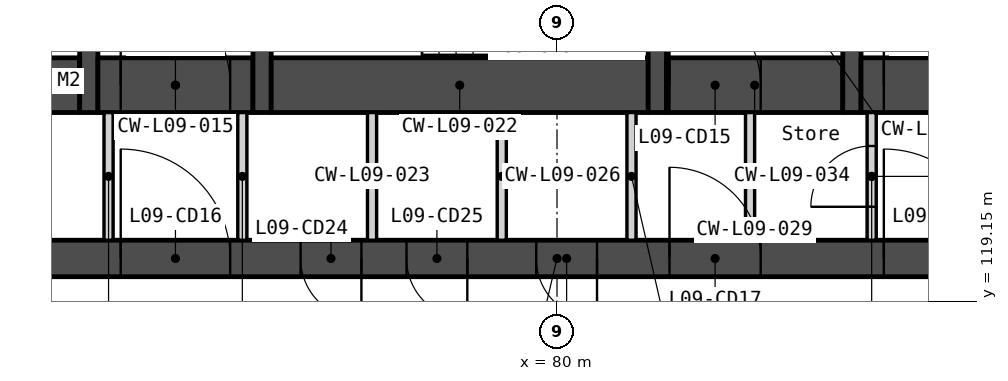
"""IFC4 building model, lengths in metres.
Left out: names, types, materials, properties, quantities, classifications, styles, units other than length and angle.
Written with IfcOpenShell. Run it as: python <this file> out.ifc"""

import sys

from ifc_helpers import new_model, si_unit, direction, frame, frame_2d, origin, place, context, subcontext, project, spatial, polyline, rectangle, outline, extrude, element, fill, save


model = new_model("IFC4")
c1 = context("Model", 3, precision=1e-05, world=origin(), true_north=direction((0.0, 1.0)))
c2 = subcontext(c1, "Body", "Model", "MODEL_VIEW")
j1 = project(units=[si_unit("LENGTHUNIT", "METRE"), si_unit("PLANEANGLEUNIT", "RADIAN")], contexts=[c1])
p1 = place(None, origin())
s1 = spatial("IfcSite", under=j1, at=p1, CompositionType="ELEMENT")
p2 = place(p1, origin())
s2 = spatial("IfcBuilding", under=s1, at=p2, CompositionType="ELEMENT")
p3 = place(p2, frame((0.0, 0.0, 45.5)))
s3 = spatial("IfcBuildingStorey", under=s2, at=p3, CompositionType="ELEMENT", Elevation=45.5)
p4 = place(p3, frame((66.0, 119.85, 0.0), z_axis=(0.0, 0.0, 1.0), x_axis=(1.0, 0.0, 0.0)))
e1 = element("IfcWall", 1, at=p4, inside=s3, PredefinedType="SOLIDWALL", context=c2, shape_type="SweptSolid", body=[
    extrude(rectangle(XDim=28.0, YDim=0.6, at=frame_2d((14.0, 0.0))), origin(), (0.0, 0.0, 1.0), 3.35),
])
p5 = place(p4, frame((6.825, 0.0, 0.0)))
e2 = element("IfcOpeningElement", 2, at=p5, cuts=e1, PredefinedType="OPENING", context=c2, shape_type="SweptSolid", body=[
    extrude(rectangle(XDim=1.8, YDim=2.1, at=frame_2d((0.9, 1.05))), frame((0.0, 0.31, 0.0), z_axis=(0.0, -1.0, 0.0), x_axis=(1.0, 0.0, 0.0)), (0.0, 0.0, 1.0), 0.62),
])
p6 = place(p4, frame((15.85, 0.0, 0.0)))
e3 = element("IfcOpeningElement", 3, at=p6, cuts=e1, PredefinedType="OPENING", context=c2, shape_type="SweptSolid", body=[
    extrude(rectangle(XDim=1.5, YDim=2.1, at=frame_2d((0.75, 1.05))), frame((0.0, 0.31, 0.0), z_axis=(0.0, -1.0, 0.0), x_axis=(1.0, 0.0, 0.0)), (0.0, 0.0, 1.0), 0.62),
])
p7 = place(p4, frame((19.375, 0.0, 0.0)))
e4 = element("IfcOpeningElement", 4, at=p7, cuts=e1, PredefinedType="OPENING", context=c2, shape_type="SweptSolid", body=[
    extrude(rectangle(XDim=1.8, YDim=2.1, at=frame_2d((0.9, 1.05))), frame((0.0, 0.31, 0.0), z_axis=(0.0, -1.0, 0.0), x_axis=(1.0, 0.0, 0.0)), (0.0, 0.0, 1.0), 0.62),
])
p8 = place(p4, frame((4.425, 0.0, 0.0)))
e5 = element("IfcOpeningElement", 5, at=p8, cuts=e1, PredefinedType="OPENING", context=c2, shape_type="SweptSolid", body=[
    extrude(rectangle(XDim=1.0, YDim=2.1, at=frame_2d((0.5, 1.05))), frame((0.0, 0.31, 0.0), z_axis=(0.0, -1.0, 0.0), x_axis=(1.0, 0.0, 0.0)), (0.0, 0.0, 1.0), 0.62),
])
p9 = place(p4, frame((9.783, 0.0, 0.0)))
e6 = element("IfcOpeningElement", 6, at=p9, cuts=e1, PredefinedType="OPENING", context=c2, shape_type="SweptSolid", body=[
    extrude(rectangle(XDim=1.0, YDim=2.1, at=frame_2d((0.5, 1.05))), frame((0.0, 0.31, 0.0), z_axis=(0.0, -1.0, 0.0), x_axis=(1.0, 0.0, 0.0)), (0.0, 0.0, 1.0), 0.62),
])
p10 = place(p4, frame((11.525, 0.0, 0.0)))
e7 = element("IfcOpeningElement", 7, at=p10, cuts=e1, PredefinedType="OPENING", context=c2, shape_type="SweptSolid", body=[
    extrude(rectangle(XDim=1.0, YDim=2.1, at=frame_2d((0.5, 1.05))), frame((0.0, 0.31, 0.0), z_axis=(0.0, -1.0, 0.0), x_axis=(1.0, 0.0, 0.0)), (0.0, 0.0, 1.0), 0.62),
])
p11 = place(p4, frame((13.658, 0.0, 0.0)))
e8 = element("IfcOpeningElement", 8, at=p11, cuts=e1, PredefinedType="OPENING", context=c2, shape_type="SweptSolid", body=[
    extrude(rectangle(XDim=1.0, YDim=2.1, at=frame_2d((0.5, 1.05))), frame((0.0, 0.31, 0.0), z_axis=(0.0, -1.0, 0.0), x_axis=(1.0, 0.0, 0.0)), (0.0, 0.0, 1.0), 0.62),
])
p12 = place(p4, frame((22.575, 0.0, 0.0)))
e9 = element("IfcOpeningElement", 9, at=p12, cuts=e1, PredefinedType="OPENING", context=c2, shape_type="SweptSolid", body=[
    extrude(rectangle(XDim=1.0, YDim=2.1, at=frame_2d((0.5, 1.05))), frame((0.0, 0.31, 0.0), z_axis=(0.0, -1.0, 0.0), x_axis=(1.0, 0.0, 0.0)), (0.0, 0.0, 1.0), 0.62),
])
p13 = place(p3, frame((69.6, 122.7, 0.0), z_axis=(0.0, 0.0, 1.0), x_axis=(1.0, 0.0, 0.0)))
e10 = element("IfcWall", 10, at=p13, inside=s3, PredefinedType="SOLIDWALL", context=c2, shape_type="SweptSolid", body=[
    extrude(rectangle(XDim=2.55, YDim=0.9, at=frame_2d((1.275, 0.0))), origin(), (0.0, 0.0, 1.0), 3.35),
])
p14 = place(p3, frame((72.3, 133.95, 0.0), z_axis=(0.0, 0.0, 1.0), x_axis=(0.0, -1.0, 0.0)))
e11 = element("IfcWall", 11, at=p14, inside=s3, PredefinedType="SOLIDWALL", context=c2, shape_type="SweptSolid", body=[
    extrude(rectangle(XDim=11.7, YDim=0.3, at=frame_2d((5.85, 0.0))), origin(), (0.0, 0.0, 1.0), 3.35),
])
p15 = place(p14, frame((6.95, 0.0, 0.0)))
e12 = element("IfcOpeningElement", 12, at=p15, cuts=e11, PredefinedType="OPENING", context=c2, shape_type="SweptSolid", body=[
    extrude(rectangle(XDim=1.1, YDim=2.1, at=frame_2d((0.55, 1.05))), frame((0.0, 0.16, 0.0), z_axis=(0.0, -1.0, 0.0), x_axis=(1.0, 0.0, 0.0)), (0.0, 0.0, 1.0), 0.32),
])
p16 = place(p14, frame((9.35, 0.0, 0.0)))
e13 = element("IfcOpeningElement", 13, at=p16, cuts=e11, PredefinedType="OPENING", context=c2, shape_type="SweptSolid", body=[
    extrude(rectangle(XDim=0.9, YDim=2.1, at=frame_2d((0.45, 1.05))), frame((0.0, 0.16, 0.0), z_axis=(0.0, -1.0, 0.0), x_axis=(1.0, 0.0, 0.0)), (0.0, 0.0, 1.0), 0.32),
])
p17 = place(p14, frame((5.1, 0.0, 0.0)))
e14 = element("IfcOpeningElement", 14, at=p17, cuts=e11, PredefinedType="OPENING", context=c2, shape_type="SweptSolid", body=[
    extrude(rectangle(XDim=1.0, YDim=2.1, at=frame_2d((0.5, 1.05))), frame((0.0, 0.16, 0.0), z_axis=(0.0, -1.0, 0.0), x_axis=(1.0, 0.0, 0.0)), (0.0, 0.0, 1.0), 0.32),
])
p18 = place(p3, frame((72.45, 122.7, 0.0), z_axis=(0.0, 0.0, 1.0), x_axis=(1.0, 0.0, 0.0)))
e15 = element("IfcWall", 15, at=p18, inside=s3, PredefinedType="SOLIDWALL", context=c2, shape_type="SweptSolid", body=[
    extrude(rectangle(XDim=2.55, YDim=0.9, at=frame_2d((1.275, 0.0))), origin(), (0.0, 0.0, 1.0), 3.35),
])
p19 = place(p18, frame((0.375, 0.0, 0.0)))
e16 = element("IfcOpeningElement", 16, at=p19, cuts=e15, PredefinedType="OPENING", context=c2, shape_type="SweptSolid", body=[
    extrude(rectangle(XDim=1.8, YDim=2.1, at=frame_2d((0.9, 1.05))), frame((0.0, 0.46, 0.0), z_axis=(0.0, -1.0, 0.0), x_axis=(1.0, 0.0, 0.0)), (0.0, 0.0, 1.0), 0.92),
])
for number, where, z_axis, x_axis in (
    (17, (72.625, 122.25, 0.0), (0.0, 0.0, 1.0), (0.0, -1.0, 0.0)),
    (18, (74.825, 122.25, 0.0), (0.0, 0.0, 1.0), (0.0, -1.0, 0.0)),
):
    element("IfcWall", number, at=place(p3, frame(where, z_axis=z_axis, x_axis=x_axis)), inside=s3, PredefinedType="PARTITIONING", context=c2, shape_type="SweptSolid", body=[
        extrude(rectangle(XDim=2.1, YDim=0.15, at=frame_2d((1.05, 0.0))), origin(), (0.0, 0.0, 1.0), 3.35),
    ])
p20 = place(p3, frame((75.15, 133.95, 0.0), z_axis=(0.0, 0.0, 1.0), x_axis=(0.0, -1.0, 0.0)))
e19 = element("IfcWall", 19, at=p20, inside=s3, PredefinedType="SOLIDWALL", context=c2, shape_type="SweptSolid", body=[
    extrude(rectangle(XDim=11.7, YDim=0.3, at=frame_2d((5.85, 0.0))), origin(), (0.0, 0.0, 1.0), 3.35),
])
p21 = place(p3, frame((75.3, 122.7, 0.0), z_axis=(0.0, 0.0, 1.0), x_axis=(1.0, 0.0, 0.0)))
e20 = element("IfcWall", 20, at=p21, inside=s3, PredefinedType="SOLIDWALL", context=c2, shape_type="SweptSolid", body=[
    extrude(rectangle(XDim=6.2, YDim=0.9, at=frame_2d((3.1, 0.0))), origin(), (0.0, 0.0, 1.0), 3.35),
])
for number, where, z_axis, x_axis in (
    (21, (76.958, 122.25, 0.0), (0.0, 0.0, 1.0), (0.0, -1.0, 0.0)),
    (22, (79.092, 122.25, 0.0), (0.0, 0.0, 1.0), (0.0, -1.0, 0.0)),
    (23, (81.225, 122.25, 0.0), (0.0, 0.0, 1.0), (0.0, -1.0, 0.0)),
):
    element("IfcWall", number, at=place(p3, frame(where, z_axis=z_axis, x_axis=x_axis)), inside=s3, PredefinedType="PARTITIONING", context=c2, shape_type="SweptSolid", body=[
        extrude(rectangle(XDim=2.1, YDim=0.15, at=frame_2d((1.05, 0.0))), origin(), (0.0, 0.0, 1.0), 3.35),
    ])
p22 = place(p3, frame((81.65, 125.7, 0.0), z_axis=(0.0, 0.0, 1.0), x_axis=(0.0, -1.0, 0.0)))
e24 = element("IfcWall", 24, at=p22, inside=s3, PredefinedType="SOLIDWALL", context=c2, shape_type="SweptSolid", body=[
    extrude(rectangle(XDim=3.45, YDim=0.3, at=frame_2d((1.725, 0.0))), origin(), (0.0, 0.0, 1.0), 3.35),
])
p23 = place(p22, frame((0.75, 0.0, 0.0)))
e25 = element("IfcOpeningElement", 25, at=p23, cuts=e24, PredefinedType="OPENING", context=c2, shape_type="SweptSolid", body=[
    extrude(rectangle(XDim=1.0, YDim=2.1, at=frame_2d((0.5, 1.05))), frame((0.0, 0.16, 0.0), z_axis=(0.0, -1.0, 0.0), x_axis=(1.0, 0.0, 0.0)), (0.0, 0.0, 1.0), 0.32),
])
p24 = place(p3, frame((81.8, 122.7, 0.0), z_axis=(0.0, 0.0, 1.0), x_axis=(1.0, 0.0, 0.0)))
e26 = element("IfcWall", 26, at=p24, inside=s3, PredefinedType="SOLIDWALL", context=c2, shape_type="SweptSolid", body=[
    extrude(rectangle(XDim=2.9, YDim=0.9, at=frame_2d((1.45, 0.0))), origin(), (0.0, 0.0, 1.0), 3.35),
])
p25 = place(p24, frame((0.05, 0.0, 0.0)))
e27 = element("IfcOpeningElement", 27, at=p25, cuts=e26, PredefinedType="OPENING", context=c2, shape_type="SweptSolid", body=[
    extrude(rectangle(XDim=1.5, YDim=2.1, at=frame_2d((0.75, 1.05))), frame((0.0, 0.46, 0.0), z_axis=(0.0, -1.0, 0.0), x_axis=(1.0, 0.0, 0.0)), (0.0, 0.0, 1.0), 0.92),
])
p26 = place(p3, frame((83.175, 122.25, 0.0), z_axis=(0.0, 0.0, 1.0), x_axis=(0.0, -1.0, 0.0)))
e28 = element("IfcWall", 28, at=p26, inside=s3, PredefinedType="PARTITIONING", context=c2, shape_type="SweptSolid", body=[
    extrude(rectangle(XDim=2.1, YDim=0.15, at=frame_2d((1.05, 0.0))), origin(), (0.0, 0.0, 1.0), 3.35),
])
p27 = place(p3, frame((84.85, 133.95, 0.0), z_axis=(0.0, 0.0, 1.0), x_axis=(0.0, -1.0, 0.0)))
e29 = element("IfcWall", 29, at=p27, inside=s3, PredefinedType="SOLIDWALL", context=c2, shape_type="SweptSolid", body=[
    extrude(rectangle(XDim=11.7, YDim=0.3, at=frame_2d((5.85, 0.0))), origin(), (0.0, 0.0, 1.0), 3.35),
])
p28 = place(p3, frame((85.0, 122.7, 0.0), z_axis=(0.0, 0.0, 1.0), x_axis=(1.0, 0.0, 0.0)))
e30 = element("IfcWall", 30, at=p28, inside=s3, PredefinedType="SOLIDWALL", context=c2, shape_type="SweptSolid", body=[
    extrude(rectangle(XDim=2.55, YDim=0.9, at=frame_2d((1.275, 0.0))), origin(), (0.0, 0.0, 1.0), 3.35),
])
p29 = place(p28, frame((0.375, 0.0, 0.0)))
e31 = element("IfcOpeningElement", 31, at=p29, cuts=e30, PredefinedType="OPENING", context=c2, shape_type="SweptSolid", body=[
    extrude(rectangle(XDim=1.8, YDim=2.1, at=frame_2d((0.9, 1.05))), frame((0.0, 0.46, 0.0), z_axis=(0.0, -1.0, 0.0), x_axis=(1.0, 0.0, 0.0)), (0.0, 0.0, 1.0), 0.92),
])
p30 = place(p3, frame((85.175, 122.25, 0.0), z_axis=(0.0, 0.0, 1.0), x_axis=(0.0, -1.0, 0.0)))
e32 = element("IfcWall", 32, at=p30, inside=s3, PredefinedType="PARTITIONING", context=c2, shape_type="SweptSolid", body=[
    extrude(rectangle(XDim=2.1, YDim=0.15, at=frame_2d((1.05, 0.0))), origin(), (0.0, 0.0, 1.0), 3.35),
])
p31 = place(p30, frame((0.55, 0.0, 0.0)))
e33 = element("IfcOpeningElement", 33, at=p31, cuts=e32, PredefinedType="OPENING", context=c2, shape_type="SweptSolid", body=[
    extrude(rectangle(XDim=1.0, YDim=2.1, at=frame_2d((0.5, 1.05))), frame((0.0, 0.085, 0.0), z_axis=(0.0, -1.0, 0.0), x_axis=(1.0, 0.0, 0.0)), (0.0, 0.0, 1.0), 0.17),
])
p32 = place(p3, frame((54.495, 129.397, -0.15), z_axis=(0.0, 0.0, 1.0), x_axis=(0.499999201451, -0.866025864826, 0.0)))
e34 = element("IfcWall", 34, at=p32, inside=s3, PredefinedType="SOLIDWALL", context=c2, shape_type="SweptSolid", body=[
    extrude(outline(polyline([(44.8, 0.0), (44.8, 3.5), (0.0, 3.5), (0.0, 0.0), (44.8, 0.0)])), frame((0.0, 0.225, 0.0), z_axis=(0.0, -1.0, 0.0), x_axis=(1.0, 0.0, 0.0)), (0.0, 0.0, 1.0), 0.45),
])
p33 = place(p32, frame((3.03, 0.0, 1.05)))
e35 = element("IfcOpeningElement", 35, at=p33, cuts=e34, PredefinedType="OPENING", context=c2, shape_type="SweptSolid", body=[
    extrude(rectangle(XDim=1.2, YDim=1.5, at=frame_2d((0.6, 0.75))), frame((0.0, 0.235, 0.0), z_axis=(0.0, -1.0, 0.0), x_axis=(1.0, 0.0, 0.0)), (0.0, 0.0, 1.0), 0.47),
])
p34 = place(p32, frame((4.73, 0.0, 1.05)))
e36 = element("IfcOpeningElement", 36, at=p34, cuts=e34, PredefinedType="OPENING", context=c2, shape_type="SweptSolid", body=[
    extrude(rectangle(XDim=1.2, YDim=1.5, at=frame_2d((0.6, 0.75))), frame((0.0, 0.235, 0.0), z_axis=(0.0, -1.0, 0.0), x_axis=(1.0, 0.0, 0.0)), (0.0, 0.0, 1.0), 0.47),
])
p35 = place(p32, frame((11.99, 0.0, 1.05)))
e37 = element("IfcOpeningElement", 37, at=p35, cuts=e34, PredefinedType="OPENING", context=c2, shape_type="SweptSolid", body=[
    extrude(rectangle(XDim=1.2, YDim=1.5, at=frame_2d((0.6, 0.75))), frame((0.0, 0.235, 0.0), z_axis=(0.0, -1.0, 0.0), x_axis=(1.0, 0.0, 0.0)), (0.0, 0.0, 1.0), 0.47),
])
p36 = place(p32, frame((13.69, 0.0, 1.05)))
e38 = element("IfcOpeningElement", 38, at=p36, cuts=e34, PredefinedType="OPENING", context=c2, shape_type="SweptSolid", body=[
    extrude(rectangle(XDim=1.2, YDim=1.5, at=frame_2d((0.6, 0.75))), frame((0.0, 0.235, 0.0), z_axis=(0.0, -1.0, 0.0), x_axis=(1.0, 0.0, 0.0)), (0.0, 0.0, 1.0), 0.47),
])
p37 = place(p32, frame((20.95, 0.0, 1.05)))
e39 = element("IfcOpeningElement", 39, at=p37, cuts=e34, PredefinedType="OPENING", context=c2, shape_type="SweptSolid", body=[
    extrude(rectangle(XDim=1.2, YDim=1.5, at=frame_2d((0.6, 0.75))), frame((0.0, 0.235, 0.0), z_axis=(0.0, -1.0, 0.0), x_axis=(1.0, 0.0, 0.0)), (0.0, 0.0, 1.0), 0.47),
])
p38 = place(p32, frame((22.65, 0.0, 1.05)))
e40 = element("IfcOpeningElement", 40, at=p38, cuts=e34, PredefinedType="OPENING", context=c2, shape_type="SweptSolid", body=[
    extrude(rectangle(XDim=1.2, YDim=1.5, at=frame_2d((0.6, 0.75))), frame((0.0, 0.235, 0.0), z_axis=(0.0, -1.0, 0.0), x_axis=(1.0, 0.0, 0.0)), (0.0, 0.0, 1.0), 0.47),
])
p39 = place(p32, frame((29.91, 0.0, 1.05)))
e41 = element("IfcOpeningElement", 41, at=p39, cuts=e34, PredefinedType="OPENING", context=c2, shape_type="SweptSolid", body=[
    extrude(rectangle(XDim=1.2, YDim=1.5, at=frame_2d((0.6, 0.75))), frame((0.0, 0.235, 0.0), z_axis=(0.0, -1.0, 0.0), x_axis=(1.0, 0.0, 0.0)), (0.0, 0.0, 1.0), 0.47),
])
p40 = place(p32, frame((31.61, 0.0, 1.05)))
e42 = element("IfcOpeningElement", 42, at=p40, cuts=e34, PredefinedType="OPENING", context=c2, shape_type="SweptSolid", body=[
    extrude(rectangle(XDim=1.2, YDim=1.5, at=frame_2d((0.6, 0.75))), frame((0.0, 0.235, 0.0), z_axis=(0.0, -1.0, 0.0), x_axis=(1.0, 0.0, 0.0)), (0.0, 0.0, 1.0), 0.47),
])
p41 = place(p32, frame((38.87, 0.0, 1.05)))
e43 = element("IfcOpeningElement", 43, at=p41, cuts=e34, PredefinedType="OPENING", context=c2, shape_type="SweptSolid", body=[
    extrude(rectangle(XDim=1.2, YDim=1.5, at=frame_2d((0.6, 0.75))), frame((0.0, 0.235, 0.0), z_axis=(0.0, -1.0, 0.0), x_axis=(1.0, 0.0, 0.0)), (0.0, 0.0, 1.0), 0.47),
])
p42 = place(p32, frame((40.57, 0.0, 1.05)))
e44 = element("IfcOpeningElement", 44, at=p42, cuts=e34, PredefinedType="OPENING", context=c2, shape_type="SweptSolid", body=[
    extrude(rectangle(XDim=1.2, YDim=1.5, at=frame_2d((0.6, 0.75))), frame((0.0, 0.235, 0.0), z_axis=(0.0, -1.0, 0.0), x_axis=(1.0, 0.0, 0.0)), (0.0, 0.0, 1.0), 0.47),
])
p43 = place(p3, frame((83.105, 90.599, -0.15), z_axis=(0.0, 0.0, 1.0), x_axis=(0.499999201451, 0.866025864826, 0.0)))
e45 = element("IfcWall", 45, at=p43, inside=s3, PredefinedType="SOLIDWALL", context=c2, shape_type="SweptSolid", body=[
    extrude(outline(polyline([(44.8, 0.0), (44.8, 3.5), (0.0, 3.5), (0.0, 0.0), (44.8, 0.0)])), frame((0.0, 0.225, 0.0), z_axis=(0.0, -1.0, 0.0), x_axis=(1.0, 0.0, 0.0)), (0.0, 0.0, 1.0), 0.45),
])
p44 = place(p43, frame((3.03, 0.0, 1.05)))
e46 = element("IfcOpeningElement", 46, at=p44, cuts=e45, PredefinedType="OPENING", context=c2, shape_type="SweptSolid", body=[
    extrude(rectangle(XDim=1.2, YDim=1.5, at=frame_2d((0.6, 0.75))), frame((0.0, 0.235, 0.0), z_axis=(0.0, -1.0, 0.0), x_axis=(1.0, 0.0, 0.0)), (0.0, 0.0, 1.0), 0.47),
])
p45 = place(p43, frame((4.73, 0.0, 1.05)))
e47 = element("IfcOpeningElement", 47, at=p45, cuts=e45, PredefinedType="OPENING", context=c2, shape_type="SweptSolid", body=[
    extrude(rectangle(XDim=1.2, YDim=1.5, at=frame_2d((0.6, 0.75))), frame((0.0, 0.235, 0.0), z_axis=(0.0, -1.0, 0.0), x_axis=(1.0, 0.0, 0.0)), (0.0, 0.0, 1.0), 0.47),
])
p46 = place(p43, frame((11.99, 0.0, 1.05)))
e48 = element("IfcOpeningElement", 48, at=p46, cuts=e45, PredefinedType="OPENING", context=c2, shape_type="SweptSolid", body=[
    extrude(rectangle(XDim=1.2, YDim=1.5, at=frame_2d((0.6, 0.75))), frame((0.0, 0.235, 0.0), z_axis=(0.0, -1.0, 0.0), x_axis=(1.0, 0.0, 0.0)), (0.0, 0.0, 1.0), 0.47),
])
p47 = place(p43, frame((13.69, 0.0, 1.05)))
e49 = element("IfcOpeningElement", 49, at=p47, cuts=e45, PredefinedType="OPENING", context=c2, shape_type="SweptSolid", body=[
    extrude(rectangle(XDim=1.2, YDim=1.5, at=frame_2d((0.6, 0.75))), frame((0.0, 0.235, 0.0), z_axis=(0.0, -1.0, 0.0), x_axis=(1.0, 0.0, 0.0)), (0.0, 0.0, 1.0), 0.47),
])
p48 = place(p43, frame((20.95, 0.0, 1.05)))
e50 = element("IfcOpeningElement", 50, at=p48, cuts=e45, PredefinedType="OPENING", context=c2, shape_type="SweptSolid", body=[
    extrude(rectangle(XDim=1.2, YDim=1.5, at=frame_2d((0.6, 0.75))), frame((0.0, 0.235, 0.0), z_axis=(0.0, -1.0, 0.0), x_axis=(1.0, 0.0, 0.0)), (0.0, 0.0, 1.0), 0.47),
])
p49 = place(p43, frame((22.65, 0.0, 1.05)))
e51 = element("IfcOpeningElement", 51, at=p49, cuts=e45, PredefinedType="OPENING", context=c2, shape_type="SweptSolid", body=[
    extrude(rectangle(XDim=1.2, YDim=1.5, at=frame_2d((0.6, 0.75))), frame((0.0, 0.235, 0.0), z_axis=(0.0, -1.0, 0.0), x_axis=(1.0, 0.0, 0.0)), (0.0, 0.0, 1.0), 0.47),
])
p50 = place(p43, frame((29.91, 0.0, 1.05)))
e52 = element("IfcOpeningElement", 52, at=p50, cuts=e45, PredefinedType="OPENING", context=c2, shape_type="SweptSolid", body=[
    extrude(rectangle(XDim=1.2, YDim=1.5, at=frame_2d((0.6, 0.75))), frame((0.0, 0.235, 0.0), z_axis=(0.0, -1.0, 0.0), x_axis=(1.0, 0.0, 0.0)), (0.0, 0.0, 1.0), 0.47),
])
p51 = place(p43, frame((31.61, 0.0, 1.05)))
e53 = element("IfcOpeningElement", 53, at=p51, cuts=e45, PredefinedType="OPENING", context=c2, shape_type="SweptSolid", body=[
    extrude(rectangle(XDim=1.2, YDim=1.5, at=frame_2d((0.6, 0.75))), frame((0.0, 0.235, 0.0), z_axis=(0.0, -1.0, 0.0), x_axis=(1.0, 0.0, 0.0)), (0.0, 0.0, 1.0), 0.47),
])
p52 = place(p43, frame((38.87, 0.0, 1.05)))
e54 = element("IfcOpeningElement", 54, at=p52, cuts=e45, PredefinedType="OPENING", context=c2, shape_type="SweptSolid", body=[
    extrude(rectangle(XDim=1.2, YDim=1.5, at=frame_2d((0.6, 0.75))), frame((0.0, 0.235, 0.0), z_axis=(0.0, -1.0, 0.0), x_axis=(1.0, 0.0, 0.0)), (0.0, 0.0, 1.0), 0.47),
])
p53 = place(p43, frame((40.57, 0.0, 1.05)))
e55 = element("IfcOpeningElement", 55, at=p53, cuts=e45, PredefinedType="OPENING", context=c2, shape_type="SweptSolid", body=[
    extrude(rectangle(XDim=1.2, YDim=1.5, at=frame_2d((0.6, 0.75))), frame((0.0, 0.235, 0.0), z_axis=(0.0, -1.0, 0.0), x_axis=(1.0, 0.0, 0.0)), (0.0, 0.0, 1.0), 0.47),
])
p54 = place(p29, origin())
e56 = element("IfcDoor", 56, at=p54, inside=s3, OperationType="DOUBLE_DOOR_DOUBLE_SWING", PredefinedType="DOOR", context=c2, shape_type="SweptSolid", body=[
    extrude(rectangle(XDim=1.8, YDim=2.1, at=frame_2d((0.9, 1.05))), frame((0.0, 0.025, 0.0), z_axis=(0.0, -1.0, 0.0), x_axis=(1.0, 0.0, 0.0)), (0.0, 0.0, 1.0), 0.05),
])
fill(e31, e56)
p55 = place(p19, origin())
e57 = element("IfcDoor", 57, at=p55, inside=s3, OperationType="DOUBLE_DOOR_DOUBLE_SWING", PredefinedType="DOOR", context=c2, shape_type="SweptSolid", body=[
    extrude(rectangle(XDim=1.8, YDim=2.1, at=frame_2d((0.9, 1.05))), frame((0.0, 0.025, 0.0), z_axis=(0.0, -1.0, 0.0), x_axis=(1.0, 0.0, 0.0)), (0.0, 0.0, 1.0), 0.05),
])
fill(e16, e57)
p56 = place(p25, origin())
e58 = element("IfcDoor", 58, at=p56, inside=s3, OperationType="DOUBLE_DOOR_DOUBLE_SWING", PredefinedType="DOOR", context=c2, shape_type="SweptSolid", body=[
    extrude(rectangle(XDim=1.5, YDim=2.1, at=frame_2d((0.75, 1.05))), frame((0.0, 0.025, 0.0), z_axis=(0.0, -1.0, 0.0), x_axis=(1.0, 0.0, 0.0)), (0.0, 0.0, 1.0), 0.05),
])
fill(e27, e58)
p57 = place(p5, origin())
e59 = element("IfcDoor", 59, at=p57, inside=s3, OperationType="DOUBLE_DOOR_DOUBLE_SWING", PredefinedType="DOOR", context=c2, shape_type="SweptSolid", body=[
    extrude(rectangle(XDim=1.8, YDim=2.1, at=frame_2d((0.9, 1.05))), frame((0.0, 0.025, 0.0), z_axis=(0.0, -1.0, 0.0), x_axis=(1.0, 0.0, 0.0)), (0.0, 0.0, 1.0), 0.05),
])
fill(e2, e59)
p58 = place(p6, origin())
e60 = element("IfcDoor", 60, at=p58, inside=s3, OperationType="DOUBLE_DOOR_DOUBLE_SWING", PredefinedType="DOOR", context=c2, shape_type="SweptSolid", body=[
    extrude(rectangle(XDim=1.5, YDim=2.1, at=frame_2d((0.75, 1.05))), frame((0.0, 0.025, 0.0), z_axis=(0.0, -1.0, 0.0), x_axis=(1.0, 0.0, 0.0)), (0.0, 0.0, 1.0), 0.05),
])
fill(e3, e60)
p59 = place(p7, origin())
e61 = element("IfcDoor", 61, at=p59, inside=s3, OperationType="DOUBLE_DOOR_DOUBLE_SWING", PredefinedType="DOOR", context=c2, shape_type="SweptSolid", body=[
    extrude(rectangle(XDim=1.8, YDim=2.1, at=frame_2d((0.9, 1.05))), frame((0.0, 0.025, 0.0), z_axis=(0.0, -1.0, 0.0), x_axis=(1.0, 0.0, 0.0)), (0.0, 0.0, 1.0), 0.05),
])
fill(e4, e61)
p60 = place(p9, origin())
e62 = element("IfcDoor", 62, at=p60, inside=s3, OperationType="SINGLE_SWING_RIGHT", PredefinedType="DOOR", context=c2, shape_type="SweptSolid", body=[
    extrude(rectangle(XDim=1.0, YDim=2.1, at=frame_2d((0.5, 1.05))), frame((0.0, 0.025, 0.0), z_axis=(0.0, -1.0, 0.0), x_axis=(1.0, 0.0, 0.0)), (0.0, 0.0, 1.0), 0.05),
])
fill(e6, e62)
p61 = place(p10, origin())
e63 = element("IfcDoor", 63, at=p61, inside=s3, OperationType="SINGLE_SWING_RIGHT", PredefinedType="DOOR", context=c2, shape_type="SweptSolid", body=[
    extrude(rectangle(XDim=1.0, YDim=2.1, at=frame_2d((0.5, 1.05))), frame((0.0, 0.025, 0.0), z_axis=(0.0, -1.0, 0.0), x_axis=(1.0, 0.0, 0.0)), (0.0, 0.0, 1.0), 0.05),
])
fill(e7, e63)
p62 = place(p11, origin())
e64 = element("IfcDoor", 64, at=p62, inside=s3, OperationType="SINGLE_SWING_RIGHT", PredefinedType="DOOR", context=c2, shape_type="SweptSolid", body=[
    extrude(rectangle(XDim=1.0, YDim=2.1, at=frame_2d((0.5, 1.05))), frame((0.0, 0.025, 0.0), z_axis=(0.0, -1.0, 0.0), x_axis=(1.0, 0.0, 0.0)), (0.0, 0.0, 1.0), 0.05),
])
fill(e8, e64)
p63 = place(p31, origin())
e65 = element("IfcDoor", 65, at=p63, inside=s3, OperationType="SINGLE_SWING_RIGHT", PredefinedType="DOOR", context=c2, shape_type="SweptSolid", body=[
    extrude(rectangle(XDim=1.0, YDim=2.1, at=frame_2d((0.5, 1.05))), frame((0.0, 0.025, 0.0), z_axis=(0.0, -1.0, 0.0), x_axis=(1.0, 0.0, 0.0)), (0.0, 0.0, 1.0), 0.05),
])
fill(e33, e65)
save(model, sys.argv[1])
